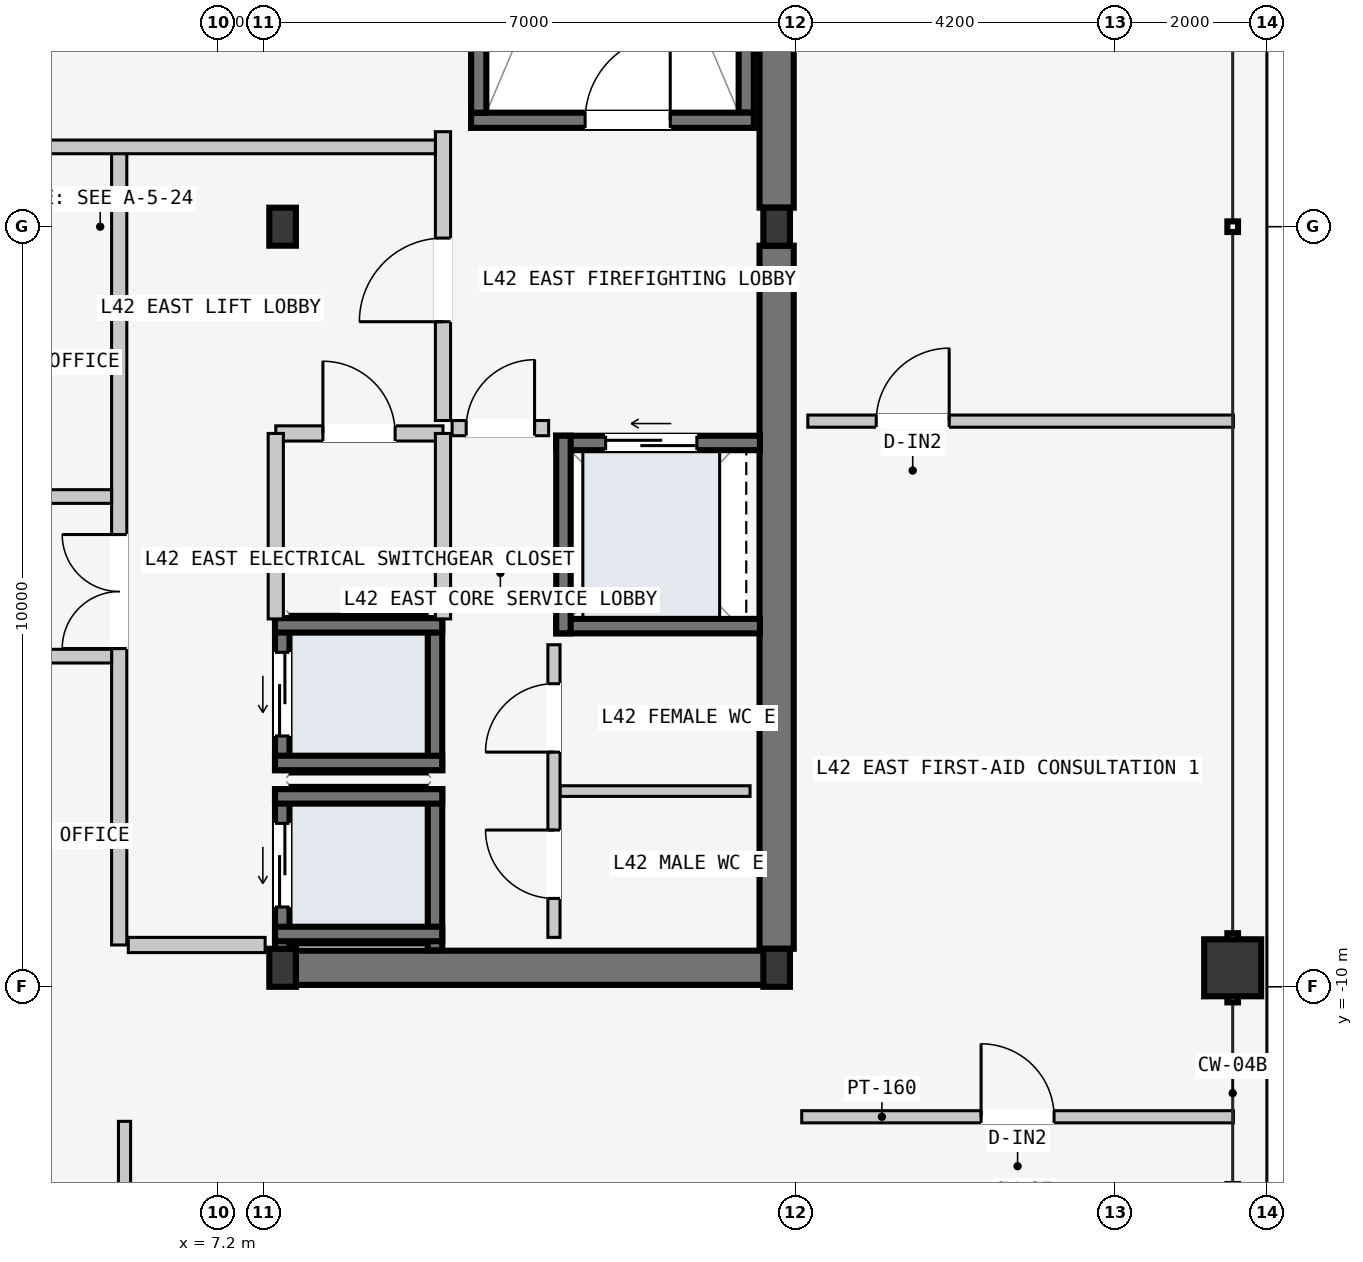
"""IFC4 building model, lengths in metres.
Left out: names, types, materials, properties, quantities, classifications, styles, units other than length and angle.
Written with IfcOpenShell. Run it as: python <this file> out.ifc"""

import sys

from ifc_helpers import new_model, si_unit, direction, frame, frame_2d, origin, origin_2d, place, context, subcontext, project, spatial, rectangle, hollow_rectangle, i_section, extrude, element, fill, save


model = new_model("IFC4")
c1 = context("Model", 3, precision=1e-05, world=origin(), true_north=direction((0.0, 1.0)))
c2 = subcontext(c1, "Body", "Model", "MODEL_VIEW")
j1 = project(units=[si_unit("LENGTHUNIT", "METRE"), si_unit("PLANEANGLEUNIT", "RADIAN")], contexts=[c1])
p1 = place(None, origin())
s1 = spatial("IfcSite", under=j1, at=p1, CompositionType="ELEMENT")
p2 = place(p1, origin())
s2 = spatial("IfcBuilding", under=s1, at=p2, CompositionType="ELEMENT")
p3 = place(p2, frame((0.0, 0.0, 162.3)))
s3 = spatial("IfcBuildingStorey", under=s2, at=p3, CompositionType="ELEMENT", Elevation=162.3)
p4 = place(p3, frame((8.07, -9.75, -0.2), z_axis=(0.0, 0.0, 1.0), x_axis=(1.0, 0.0, 0.0)))
e1 = element("IfcWall", 1, at=p4, inside=s3, PredefinedType="SHEAR", context=c2, shape_type="SweptSolid", body=[
    extrude(rectangle(XDim=6.46, YDim=0.45, at=frame_2d((3.23, 0.0))), origin(), (0.0, 0.0, 1.0), 3.6),
])
for number, where, z_axis, x_axis in (
    (2, (14.55, -9.5, -0.2), (0.0, 0.0, 1.0), (0.0, 1.0, 0.0)),
    (3, (14.55, 0.25, -0.2), (0.0, 0.0, 1.0), (0.0, 1.0, 0.0)),
):
    element("IfcWall", number, at=place(p3, frame(where, z_axis=z_axis, x_axis=x_axis)), inside=s3, PredefinedType="SHEAR", context=c2, shape_type="SweptSolid", body=[
        extrude(rectangle(XDim=9.25, YDim=0.45, at=frame_2d((4.625, 0.0))), origin(), (0.0, 0.0, 1.0), 3.6),
    ])
p5 = place(p3, frame((14.15, 1.5, -0.2), z_axis=(0.0, 0.0, 1.0), x_axis=(0.0, 1.0, 0.0)))
e4 = element("IfcWall", 4, at=p5, inside=s3, PredefinedType="SOLIDWALL", context=c2, shape_type="SweptSolid", body=[
    extrude(rectangle(XDim=7.8, YDim=0.2, at=frame_2d((3.9, 0.0))), origin(), (0.0, 0.0, 1.0), 3.6),
])
p6 = place(p3, frame((10.53, 1.4, -0.2), z_axis=(0.0, 0.0, 1.0), x_axis=(1.0, 0.0, 0.0)))
e5 = element("IfcWall", 5, at=p6, inside=s3, PredefinedType="SOLIDWALL", context=c2, shape_type="SweptSolid", body=[
    extrude(rectangle(XDim=3.72, YDim=0.2, at=frame_2d((1.86, 0.0))), origin(), (0.0, 0.0, 1.0), 3.6),
])
p7 = place(p6, frame((1.5, 0.0, 0.2)))
e6 = element("IfcOpeningElement", 6, at=p7, cuts=e5, PredefinedType="OPENING", context=c2, shape_type="SweptSolid", body=[
    extrude(rectangle(XDim=1.12, YDim=2.18, at=frame_2d((0.56, 1.09))), frame((0.0, 0.11, 0.0), z_axis=(0.0, -1.0, 0.0), x_axis=(1.0, 0.0, 0.0)), (0.0, 0.0, 1.0), 0.22),
])
p8 = place(p3, frame((10.63, 1.5, -0.2), z_axis=(0.0, 0.0, 1.0), x_axis=(0.0, 1.0, 0.0)))
e7 = element("IfcWall", 7, at=p8, inside=s3, PredefinedType="SOLIDWALL", context=c2, shape_type="SweptSolid", body=[
    extrude(rectangle(XDim=7.8, YDim=0.2, at=frame_2d((3.9, 0.0))), origin(), (0.0, 0.0, 1.0), 3.6),
])
for number, where, z_axis, x_axis in (
    (8, (8.05, -9.75, 0.0), (0.0, 0.0, 1.0), (1.0, 0.0, 0.0)),
    (9, (8.05, 0.0, 0.0), (0.0, 0.0, 1.0), (1.0, 0.0, 0.0)),
    (10, (14.55, -9.75, 0.0), (0.0, 0.0, 1.0), (1.0, 0.0, 0.0)),
    (11, (14.55, 0.0, 0.0), (0.0, 0.0, 1.0), (1.0, 0.0, 0.0)),
):
    element("IfcColumn", number, at=place(p3, frame(where, z_axis=z_axis, x_axis=x_axis)), inside=s3, PredefinedType="COLUMN", context=c2, shape_type="SweptSolid", body=[
        extrude(i_section(OverallWidth=0.35, OverallDepth=0.5, WebThickness=0.02, FlangeThickness=0.032, at=origin_2d()), origin(), (0.0, 0.0, 1.0), 3.6),
    ])
p9 = place(p3, frame((20.55, -9.75, 0.0), z_axis=(0.0, 0.0, 1.0), x_axis=(0.0, 1.0, 0.0)))
e12 = element("IfcColumn", 12, at=p9, inside=s3, PredefinedType="COLUMN", context=c2, shape_type="SweptSolid", body=[
    extrude(hollow_rectangle(XDim=0.75, YDim=0.75, WallThickness=0.032, at=origin_2d()), origin(), (0.0, 0.0, 1.0), 3.6),
])
p10 = place(p3, frame((8.045, -9.52, -0.2), z_axis=(0.0, 0.0, 1.0), x_axis=(0.0, 1.0, 0.0)))
e13 = element("IfcWall", 13, at=p10, inside=s3, PredefinedType="SOLIDWALL", context=c2, shape_type="SweptSolid", body=[
    extrude(rectangle(XDim=2.12, YDim=0.19, at=frame_2d((1.06, 0.0))), origin(), (0.0, 0.0, 1.0), 3.6),
])
p11 = place(p10, frame((0.57, 0.0, 0.2)))
e14 = element("IfcOpeningElement", 14, at=p11, cuts=e13, PredefinedType="OPENING", context=c2, shape_type="SweptSolid", body=[
    extrude(rectangle(XDim=1.1, YDim=2.2, at=frame_2d((0.55, 1.1))), frame((0.0, 0.105, 0.0), z_axis=(0.0, -1.0, 0.0), x_axis=(1.0, 0.0, 0.0)), (0.0, 0.0, 1.0), 0.21),
])
p12 = place(p3, frame((10.055, -9.52, -0.2), z_axis=(0.0, 0.0, 1.0), x_axis=(0.0, 1.0, 0.0)))
e15 = element("IfcWall", 15, at=p12, inside=s3, PredefinedType="SOLIDWALL", context=c2, shape_type="SweptSolid", body=[
    extrude(rectangle(XDim=2.12, YDim=0.19, at=frame_2d((1.06, 0.0))), origin(), (0.0, 0.0, 1.0), 3.6),
])
for number, where, z_axis, x_axis in (
    (16, (7.95, -7.495, -0.2), (0.0, 0.0, 1.0), (1.0, 0.0, 0.0)),
    (17, (7.95, -9.305, -0.2), (0.0, 0.0, 1.0), (1.0, 0.0, 0.0)),
):
    element("IfcWall", number, at=place(p3, frame(where, z_axis=z_axis, x_axis=x_axis)), inside=s3, PredefinedType="SOLIDWALL", context=c2, shape_type="SweptSolid", body=[
        extrude(rectangle(XDim=2.2, YDim=0.19, at=frame_2d((1.1, 0.0))), origin(), (0.0, 0.0, 1.0), 3.6),
    ])
p13 = place(p3, frame((8.045, -7.15, -0.2), z_axis=(0.0, 0.0, 1.0), x_axis=(0.0, 1.0, 0.0)))
e18 = element("IfcWall", 18, at=p13, inside=s3, PredefinedType="SOLIDWALL", context=c2, shape_type="SweptSolid", body=[
    extrude(rectangle(XDim=2.0, YDim=0.19, at=frame_2d((1.0, 0.0))), origin(), (0.0, 0.0, 1.0), 3.6),
])
p14 = place(p13, frame((0.45, 0.0, 0.2)))
e19 = element("IfcOpeningElement", 19, at=p14, cuts=e18, PredefinedType="OPENING", context=c2, shape_type="SweptSolid", body=[
    extrude(rectangle(XDim=1.1, YDim=2.2, at=frame_2d((0.55, 1.1))), frame((0.0, 0.105, 0.0), z_axis=(0.0, -1.0, 0.0), x_axis=(1.0, 0.0, 0.0)), (0.0, 0.0, 1.0), 0.21),
])
p15 = place(p3, frame((10.055, -7.15, -0.2), z_axis=(0.0, 0.0, 1.0), x_axis=(0.0, 1.0, 0.0)))
e20 = element("IfcWall", 20, at=p15, inside=s3, PredefinedType="SOLIDWALL", context=c2, shape_type="SweptSolid", body=[
    extrude(rectangle(XDim=2.0, YDim=0.19, at=frame_2d((1.0, 0.0))), origin(), (0.0, 0.0, 1.0), 3.6),
])
for number, where, z_axis, x_axis in (
    (21, (7.95, -5.245, -0.2), (0.0, 0.0, 1.0), (1.0, 0.0, 0.0)),
    (22, (7.95, -7.055, -0.2), (0.0, 0.0, 1.0), (1.0, 0.0, 0.0)),
):
    element("IfcWall", number, at=place(p3, frame(where, z_axis=z_axis, x_axis=x_axis)), inside=s3, PredefinedType="SOLIDWALL", context=c2, shape_type="SweptSolid", body=[
        extrude(rectangle(XDim=2.2, YDim=0.19, at=frame_2d((1.1, 0.0))), origin(), (0.0, 0.0, 1.0), 3.6),
    ])
p16 = place(p3, frame((11.65, -2.845, -0.2), z_axis=(0.0, 0.0, 1.0), x_axis=(1.0, 0.0, 0.0)))
e23 = element("IfcWall", 23, at=p16, inside=s3, PredefinedType="SOLIDWALL", context=c2, shape_type="SweptSolid", body=[
    extrude(rectangle(XDim=2.68, YDim=0.19, at=frame_2d((1.34, 0.0))), origin(), (0.0, 0.0, 1.0), 3.6),
])
p17 = place(p16, frame((0.65, 0.0, 0.2)))
e24 = element("IfcOpeningElement", 24, at=p17, cuts=e23, PredefinedType="OPENING", context=c2, shape_type="SweptSolid", body=[
    extrude(rectangle(XDim=1.2, YDim=2.2, at=frame_2d((0.6, 1.1))), frame((0.0, 0.105, 0.0), z_axis=(0.0, -1.0, 0.0), x_axis=(1.0, 0.0, 0.0)), (0.0, 0.0, 1.0), 0.21),
])
p18 = place(p3, frame((11.65, -5.255, -0.2), z_axis=(0.0, 0.0, 1.0), x_axis=(1.0, 0.0, 0.0)))
e25 = element("IfcWall", 25, at=p18, inside=s3, PredefinedType="SOLIDWALL", context=c2, shape_type="SweptSolid", body=[
    extrude(rectangle(XDim=2.68, YDim=0.19, at=frame_2d((1.34, 0.0))), origin(), (0.0, 0.0, 1.0), 3.6),
])
p19 = place(p3, frame((11.745, -5.35, -0.2), z_axis=(0.0, 0.0, 1.0), x_axis=(0.0, 1.0, 0.0)))
e26 = element("IfcWall", 26, at=p19, inside=s3, PredefinedType="SOLIDWALL", context=c2, shape_type="SweptSolid", body=[
    extrude(rectangle(XDim=2.6, YDim=0.19, at=frame_2d((1.3, 0.0))), origin(), (0.0, 0.0, 1.0), 3.6),
])
p20 = place(p3, frame((5.9, -9.45, 0.0), z_axis=(0.0, 0.0, 1.0), x_axis=(0.0, 1.0, 0.0)))
e27 = element("IfcWall", 27, at=p20, inside=s3, PredefinedType="PARTITIONING", context=c2, shape_type="SweptSolid", body=[
    extrude(rectangle(XDim=10.5, YDim=0.2, at=frame_2d((5.25, 0.0))), origin(), (0.0, 0.0, 1.0), 3.4),
])
p21 = place(p20, frame((3.9, 0.0, 0.0)))
e28 = element("IfcOpeningElement", 28, at=p21, cuts=e27, PredefinedType="OPENING", context=c2, shape_type="SweptSolid", body=[
    extrude(rectangle(XDim=1.5, YDim=2.2, at=frame_2d((0.75, 1.1))), frame((0.0, 0.11, 0.0), z_axis=(0.0, -1.0, 0.0), x_axis=(1.0, 0.0, 0.0)), (0.0, 0.0, 1.0), 0.22),
])
p22 = place(p3, frame((6.02, -9.45, 0.0), z_axis=(0.0, 0.0, 1.0), x_axis=(1.0, 0.0, 0.0)))
e29 = element("IfcWall", 29, at=p22, inside=s3, PredefinedType="PARTITIONING", context=c2, shape_type="SweptSolid", body=[
    extrude(rectangle(XDim=1.8, YDim=0.2, at=frame_2d((0.9, 0.0))), origin(), (0.0, 0.0, 1.0), 3.4),
])
p23 = place(p3, frame((10.16, -2.55, 0.0), z_axis=(0.0, 0.0, 1.0), x_axis=(0.0, 1.0, 0.0)))
e30 = element("IfcWall", 30, at=p23, inside=s3, PredefinedType="PARTITIONING", context=c2, shape_type="SweptSolid", body=[
    extrude(rectangle(XDim=3.8, YDim=0.2, at=frame_2d((1.9, 0.0))), origin(), (0.0, 0.0, 1.0), 3.4),
])
p24 = place(p23, frame((1.3, 0.0, 0.0)))
e31 = element("IfcOpeningElement", 31, at=p24, cuts=e30, PredefinedType="OPENING", context=c2, shape_type="SweptSolid", body=[
    extrude(rectangle(XDim=1.1, YDim=2.15, at=frame_2d((0.55, 1.075))), frame((0.0, 0.11, 0.0), z_axis=(0.0, -1.0, 0.0), x_axis=(1.0, 0.0, 0.0)), (0.0, 0.0, 1.0), 0.22),
])
p25 = place(p3, frame((10.28, -2.65, 0.0), z_axis=(0.0, 0.0, 1.0), x_axis=(1.0, 0.0, 0.0)))
e32 = element("IfcWall", 32, at=p25, inside=s3, PredefinedType="PARTITIONING", context=c2, shape_type="SweptSolid", body=[
    extrude(rectangle(XDim=1.27, YDim=0.2, at=frame_2d((0.635, 0.0))), origin(), (0.0, 0.0, 1.0), 3.4),
])
p26 = place(p25, frame((0.185, 0.0, 0.0)))
e33 = element("IfcOpeningElement", 33, at=p26, cuts=e32, PredefinedType="OPENING", context=c2, shape_type="SweptSolid", body=[
    extrude(rectangle(XDim=0.9, YDim=2.15, at=frame_2d((0.45, 1.075))), frame((0.0, 0.11, 0.0), z_axis=(0.0, -1.0, 0.0), x_axis=(1.0, 0.0, 0.0)), (0.0, 0.0, 1.0), 0.22),
])
p27 = place(p3, frame((7.96, -2.72, 0.0), z_axis=(0.0, 0.0, 1.0), x_axis=(1.0, 0.0, 0.0)))
e34 = element("IfcWall", 34, at=p27, inside=s3, PredefinedType="PARTITIONING", context=c2, shape_type="SweptSolid", body=[
    extrude(rectangle(XDim=2.2, YDim=0.2, at=frame_2d((1.1, 0.0))), origin(), (0.0, 0.0, 1.0), 3.4),
])
p28 = place(p27, frame((0.62, 0.0, 0.0)))
e35 = element("IfcOpeningElement", 35, at=p28, cuts=e34, PredefinedType="OPENING", context=c2, shape_type="SweptSolid", body=[
    extrude(rectangle(XDim=0.95, YDim=2.1, at=frame_2d((0.475, 1.05))), frame((0.0, 0.11, 0.0), z_axis=(0.0, -1.0, 0.0), x_axis=(1.0, 0.0, 0.0)), (0.0, 0.0, 1.0), 0.22),
])
for number, where, z_axis, x_axis in (
    (36, (7.96, -5.16, 0.0), (0.0, 0.0, 1.0), (0.0, 1.0, 0.0)),
    (37, (10.16, -5.16, 0.0), (0.0, 0.0, 1.0), (0.0, 1.0, 0.0)),
):
    element("IfcWall", number, at=place(p3, frame(where, z_axis=z_axis, x_axis=x_axis)), inside=s3, PredefinedType="PARTITIONING", context=c2, shape_type="SweptSolid", body=[
        extrude(rectangle(XDim=2.44, YDim=0.2, at=frame_2d((1.22, 0.0))), origin(), (0.0, 0.0, 1.0), 3.4),
    ])
p29 = place(p3, frame((11.7, -7.425, 0.0), z_axis=(0.0, 0.0, 1.0), x_axis=(1.0, 0.0, 0.0)))
e38 = element("IfcWall", 38, at=p29, inside=s3, PredefinedType="PARTITIONING", context=c2, shape_type="SweptSolid", body=[
    extrude(rectangle(XDim=2.5, YDim=0.14, at=frame_2d((1.25, 0.0))), origin(), (0.0, 0.0, 1.0), 3.4),
])
p30 = place(p3, frame((11.62, -9.35, 0.0), z_axis=(0.0, 0.0, 1.0), x_axis=(0.0, 1.0, 0.0)))
e39 = element("IfcWall", 39, at=p30, inside=s3, PredefinedType="PARTITIONING", context=c2, shape_type="SweptSolid", body=[
    extrude(rectangle(XDim=3.85, YDim=0.16, at=frame_2d((1.925, 0.0))), origin(), (0.0, 0.0, 1.0), 3.4),
])
p31 = place(p30, frame((0.512, 0.0, 0.0)))
e40 = element("IfcOpeningElement", 40, at=p31, cuts=e39, PredefinedType="OPENING", context=c2, shape_type="SweptSolid", body=[
    extrude(rectangle(XDim=0.9, YDim=2.15, at=frame_2d((0.45, 1.075))), frame((0.0, 0.09, 0.0), z_axis=(0.0, -1.0, 0.0), x_axis=(1.0, 0.0, 0.0)), (0.0, 0.0, 1.0), 0.18),
])
p32 = place(p30, frame((2.438, 0.0, 0.0)))
e41 = element("IfcOpeningElement", 41, at=p32, cuts=e39, PredefinedType="OPENING", context=c2, shape_type="SweptSolid", body=[
    extrude(rectangle(XDim=0.9, YDim=2.15, at=frame_2d((0.45, 1.075))), frame((0.0, 0.09, 0.0), z_axis=(0.0, -1.0, 0.0), x_axis=(1.0, 0.0, 0.0)), (0.0, 0.0, 1.0), 0.18),
])
p33 = place(p3, frame((1.26, 1.05, 0.0), z_axis=(0.0, 0.0, 1.0), x_axis=(1.0, 0.0, 0.0)))
e42 = element("IfcWall", 42, at=p33, inside=s3, PredefinedType="PARTITIONING", context=c2, shape_type="SweptSolid", body=[
    extrude(rectangle(XDim=8.8, YDim=0.18, at=frame_2d((4.4, 0.0))), origin(), (0.0, 0.0, 1.0), 3.4),
])
for number, where, z_axis, x_axis in (
    (43, (1.26, -3.55, 0.0), (0.0, 0.0, 1.0), (1.0, 0.0, 0.0)),
    (44, (1.26, -5.65, 0.0), (0.0, 0.0, 1.0), (1.0, 0.0, 0.0)),
):
    element("IfcWall", number, at=place(p3, frame(where, z_axis=z_axis, x_axis=x_axis)), inside=s3, PredefinedType="PARTITIONING", context=c2, shape_type="SweptSolid", body=[
        extrude(rectangle(XDim=4.54, YDim=0.18, at=frame_2d((2.27, 0.0))), origin(), (0.0, 0.0, 1.0), 3.4),
    ])
p34 = place(p3, frame((5.97, -18.56, 0.0), z_axis=(0.0, 0.0, 1.0), x_axis=(0.0, 1.0, 0.0)))
e45 = element("IfcWall", 45, at=p34, inside=s3, PredefinedType="PARTITIONING", context=c2, shape_type="SweptSolid", body=[
    extrude(rectangle(XDim=6.79, YDim=0.16, at=frame_2d((3.395, 0.0))), origin(), (0.0, 0.0, 1.0), 3.4),
])
p35 = place(p34, frame((1.05, 0.0, 0.0)))
e46 = element("IfcOpeningElement", 46, at=p35, cuts=e45, PredefinedType="OPENING", context=c2, shape_type="SweptSolid", body=[
    extrude(rectangle(XDim=0.96, YDim=2.18, at=frame_2d((0.48, 1.09))), frame((0.0, 0.09, 0.0), z_axis=(0.0, -1.0, 0.0), x_axis=(1.0, 0.0, 0.0)), (0.0, 0.0, 1.0), 0.18),
])
p36 = place(p3, frame((14.88, -11.71, 0.0), z_axis=(0.0, 0.0, 1.0), x_axis=(1.0, 0.0, 0.0)))
e47 = element("IfcWall", 47, at=p36, inside=s3, PredefinedType="PARTITIONING", context=c2, shape_type="SweptSolid", body=[
    extrude(rectangle(XDim=5.68, YDim=0.16, at=frame_2d((2.84, 0.0))), origin(), (0.0, 0.0, 1.0), 3.4),
])
p37 = place(p36, frame((2.36, 0.0, 0.0)))
e48 = element("IfcOpeningElement", 48, at=p37, cuts=e47, PredefinedType="OPENING", context=c2, shape_type="SweptSolid", body=[
    extrude(rectangle(XDim=0.96, YDim=2.18, at=frame_2d((0.48, 1.09))), frame((0.0, 0.09, 0.0), z_axis=(0.0, -1.0, 0.0), x_axis=(1.0, 0.0, 0.0)), (0.0, 0.0, 1.0), 0.18),
])
p38 = place(p3, frame((14.96, -2.558, 0.0), z_axis=(0.0, 0.0, 1.0), x_axis=(1.0, 0.0, 0.0)))
e49 = element("IfcWall", 49, at=p38, inside=s3, PredefinedType="PARTITIONING", context=c2, shape_type="SweptSolid", body=[
    extrude(rectangle(XDim=5.6, YDim=0.16, at=frame_2d((2.8, 0.0))), origin(), (0.0, 0.0, 1.0), 3.4),
])
p39 = place(p38, frame((0.9, 0.0, 0.0)))
e50 = element("IfcOpeningElement", 50, at=p39, cuts=e49, PredefinedType="OPENING", context=c2, shape_type="SweptSolid", body=[
    extrude(rectangle(XDim=0.96, YDim=2.18, at=frame_2d((0.48, 1.09))), frame((0.0, 0.09, 0.0), z_axis=(0.0, -1.0, 0.0), x_axis=(1.0, 0.0, 0.0)), (0.0, 0.0, 1.0), 0.18),
])
p40 = place(p7, origin())
e51 = element("IfcDoor", 51, at=p40, inside=s3, OperationType="SINGLE_SWING_RIGHT", PredefinedType="DOOR", context=c2, shape_type="SweptSolid", body=[
    extrude(rectangle(XDim=1.12, YDim=2.18, at=frame_2d((0.56, 1.09))), frame((0.0, 0.025, 0.0), z_axis=(0.0, -1.0, 0.0), x_axis=(1.0, 0.0, 0.0)), (0.0, 0.0, 1.0), 0.05),
])
fill(e6, e51)
p41 = place(p11, origin())
e52 = element("IfcDoor", 52, at=p41, inside=s3, OperationType="SLIDING_TO_LEFT", PredefinedType="DOOR", context=c2, shape_type="SweptSolid", body=[
    extrude(rectangle(XDim=1.1, YDim=2.2, at=frame_2d((0.55, 1.1))), frame((0.0, 0.025, 0.0), z_axis=(0.0, -1.0, 0.0), x_axis=(1.0, 0.0, 0.0)), (0.0, 0.0, 1.0), 0.05),
])
fill(e14, e52)
p42 = place(p14, origin())
e53 = element("IfcDoor", 53, at=p42, inside=s3, OperationType="SLIDING_TO_LEFT", PredefinedType="DOOR", context=c2, shape_type="SweptSolid", body=[
    extrude(rectangle(XDim=1.1, YDim=2.2, at=frame_2d((0.55, 1.1))), frame((0.0, 0.025, 0.0), z_axis=(0.0, -1.0, 0.0), x_axis=(1.0, 0.0, 0.0)), (0.0, 0.0, 1.0), 0.05),
])
fill(e19, e53)
p43 = place(p17, origin())
e54 = element("IfcDoor", 54, at=p43, inside=s3, OperationType="SLIDING_TO_LEFT", PredefinedType="DOOR", context=c2, shape_type="SweptSolid", body=[
    extrude(rectangle(XDim=1.2, YDim=2.2, at=frame_2d((0.6, 1.1))), frame((0.0, 0.025, 0.0), z_axis=(0.0, -1.0, 0.0), x_axis=(1.0, 0.0, 0.0)), (0.0, 0.0, 1.0), 0.05),
])
fill(e24, e54)
p44 = place(p21, origin())
e55 = element("IfcDoor", 55, at=p44, inside=s3, OperationType="DOUBLE_DOOR_SINGLE_SWING", PredefinedType="DOOR", context=c2, shape_type="SweptSolid", body=[
    extrude(rectangle(XDim=1.5, YDim=2.2, at=frame_2d((0.75, 1.1))), frame((0.0, 0.025, 0.0), z_axis=(0.0, -1.0, 0.0), x_axis=(1.0, 0.0, 0.0)), (0.0, 0.0, 1.0), 0.05),
])
fill(e28, e55)
p45 = place(p24, origin())
e56 = element("IfcDoor", 56, at=p45, inside=s3, OperationType="SINGLE_SWING_LEFT", PredefinedType="DOOR", context=c2, shape_type="SweptSolid", body=[
    extrude(rectangle(XDim=1.1, YDim=2.15, at=frame_2d((0.55, 1.075))), frame((0.0, 0.025, 0.0), z_axis=(0.0, -1.0, 0.0), x_axis=(1.0, 0.0, 0.0)), (0.0, 0.0, 1.0), 0.05),
])
fill(e31, e56)
p46 = place(p26, origin())
e57 = element("IfcDoor", 57, at=p46, inside=s3, OperationType="SINGLE_SWING_RIGHT", PredefinedType="DOOR", context=c2, shape_type="SweptSolid", body=[
    extrude(rectangle(XDim=0.9, YDim=2.15, at=frame_2d((0.45, 1.075))), frame((0.0, 0.025, 0.0), z_axis=(0.0, -1.0, 0.0), x_axis=(1.0, 0.0, 0.0)), (0.0, 0.0, 1.0), 0.05),
])
fill(e33, e57)
p47 = place(p28, origin())
e58 = element("IfcDoor", 58, at=p47, inside=s3, OperationType="SINGLE_SWING_LEFT", PredefinedType="DOOR", context=c2, shape_type="SweptSolid", body=[
    extrude(rectangle(XDim=0.95, YDim=2.1, at=frame_2d((0.475, 1.05))), frame((0.0, 0.025, 0.0), z_axis=(0.0, -1.0, 0.0), x_axis=(1.0, 0.0, 0.0)), (0.0, 0.0, 1.0), 0.05),
])
fill(e35, e58)
p48 = place(p31, origin())
e59 = element("IfcDoor", 59, at=p48, inside=s3, OperationType="SINGLE_SWING_RIGHT", PredefinedType="DOOR", context=c2, shape_type="SweptSolid", body=[
    extrude(rectangle(XDim=0.9, YDim=2.15, at=frame_2d((0.45, 1.075))), frame((0.0, 0.025, 0.0), z_axis=(0.0, -1.0, 0.0), x_axis=(1.0, 0.0, 0.0)), (0.0, 0.0, 1.0), 0.05),
])
fill(e40, e59)
p49 = place(p32, origin())
e60 = element("IfcDoor", 60, at=p49, inside=s3, OperationType="SINGLE_SWING_LEFT", PredefinedType="DOOR", context=c2, shape_type="SweptSolid", body=[
    extrude(rectangle(XDim=0.9, YDim=2.15, at=frame_2d((0.45, 1.075))), frame((0.0, 0.025, 0.0), z_axis=(0.0, -1.0, 0.0), x_axis=(1.0, 0.0, 0.0)), (0.0, 0.0, 1.0), 0.05),
])
fill(e41, e60)
p50 = place(p37, origin())
e61 = element("IfcDoor", 61, at=p50, inside=s3, OperationType="SINGLE_SWING_LEFT", PredefinedType="DOOR", context=c2, shape_type="SweptSolid", body=[
    extrude(rectangle(XDim=0.96, YDim=2.18, at=frame_2d((0.48, 1.09))), frame((0.0, 0.025, 0.0), z_axis=(0.0, -1.0, 0.0), x_axis=(1.0, 0.0, 0.0)), (0.0, 0.0, 1.0), 0.05),
])
fill(e48, e61)
p51 = place(p39, origin())
e62 = element("IfcDoor", 62, at=p51, inside=s3, OperationType="SINGLE_SWING_RIGHT", PredefinedType="DOOR", context=c2, shape_type="SweptSolid", body=[
    extrude(rectangle(XDim=0.96, YDim=2.18, at=frame_2d((0.48, 1.09))), frame((0.0, 0.025, 0.0), z_axis=(0.0, -1.0, 0.0), x_axis=(1.0, 0.0, 0.0)), (0.0, 0.0, 1.0), 0.05),
])
fill(e50, e62)
save(model, sys.argv[1])
